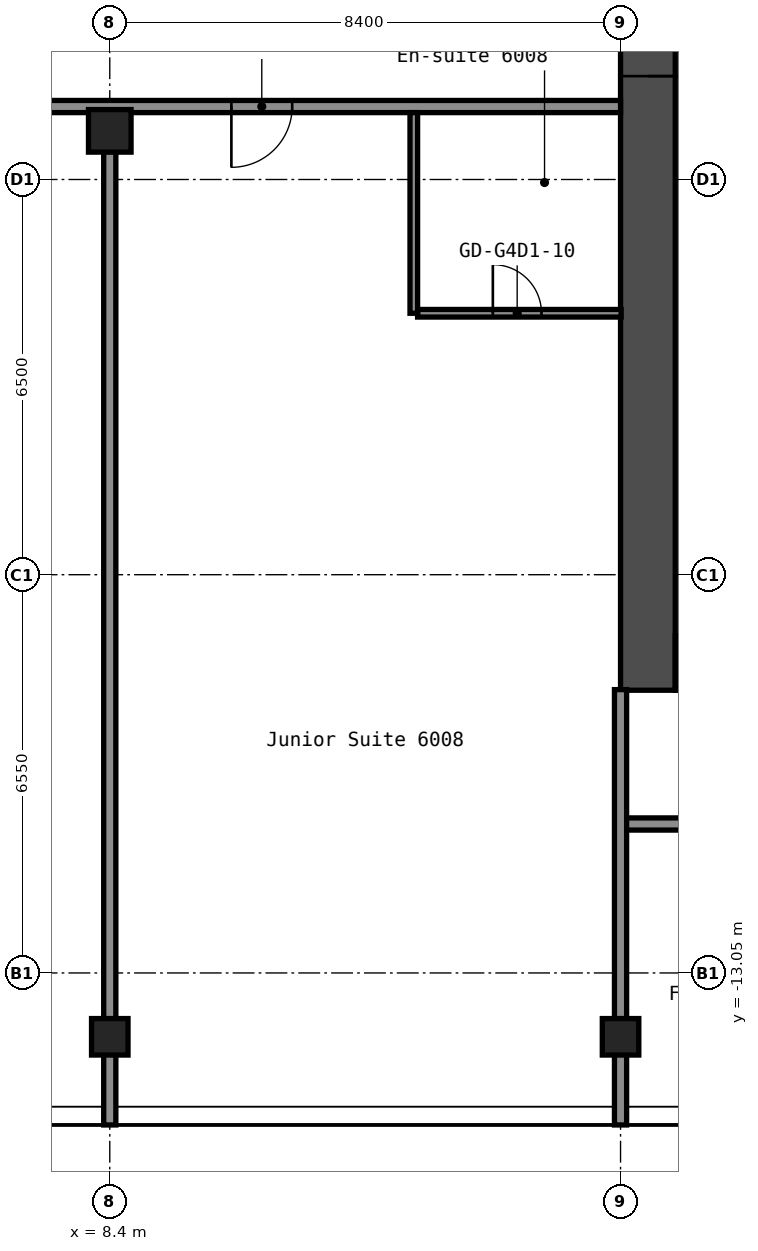
"""IFC4 building model, lengths in metres.
Left out: names, types, materials, properties, quantities, classifications, styles, units other than length and angle.
Written with IfcOpenShell. Run it as: python <this file> out.ifc"""

import sys

from ifc_helpers import new_model, si_unit, direction, frame, frame_2d, origin, origin_2d, place, context, subcontext, project, spatial, rectangle, hollow_rectangle, extrude, element, fill, save


model = new_model("IFC4")
c1 = context("Model", 3, precision=1e-05, world=origin(), true_north=direction((0.0, 1.0)))
c2 = subcontext(c1, "Body", "Model", "MODEL_VIEW")
j1 = project(units=[si_unit("LENGTHUNIT", "METRE"), si_unit("PLANEANGLEUNIT", "RADIAN")], contexts=[c1])
p1 = place(None, origin())
s1 = spatial("IfcSite", under=j1, at=p1, CompositionType="ELEMENT")
p2 = place(p1, origin())
s2 = spatial("IfcBuilding", under=s1, at=p2, CompositionType="ELEMENT")
p3 = place(p2, frame((0.0, 0.0, 212.2)))
s3 = spatial("IfcBuildingStorey", under=s2, at=p3, CompositionType="ELEMENT", Elevation=212.2)
p4 = place(p3, frame((8.4, -14.1, 0.0), z_axis=(0.0, 0.0, 1.0), x_axis=(1.0, 0.0, 0.0)))
e1 = element("IfcColumn", 1, at=p4, inside=s3, PredefinedType="COLUMN", context=c2, shape_type="SweptSolid", body=[
    extrude(hollow_rectangle(XDim=0.6, YDim=0.6, WallThickness=0.025, InnerFilletRadius=0.038, OuterFilletRadius=0.062, at=origin_2d()), origin(), (0.0, 0.0, 1.0), 2.75),
])
p5 = place(p3, frame((8.4, 0.8, 0.0), z_axis=(0.0, 0.0, 1.0), x_axis=(1.0, 0.0, 0.0)))
e2 = element("IfcColumn", 2, at=p5, inside=s3, PredefinedType="COLUMN", context=c2, shape_type="SweptSolid", body=[
    extrude(hollow_rectangle(XDim=0.7, YDim=0.7, WallThickness=0.028, at=origin_2d()), origin(), (0.0, 0.0, 1.0), 2.75),
])
p6 = place(p3, frame((16.8, -14.1, 0.0), z_axis=(0.0, 0.0, 1.0), x_axis=(1.0, 0.0, 0.0)))
e3 = element("IfcColumn", 3, at=p6, inside=s3, PredefinedType="COLUMN", context=c2, shape_type="SweptSolid", body=[
    extrude(hollow_rectangle(XDim=0.6, YDim=0.6, WallThickness=0.025, InnerFilletRadius=0.038, OuterFilletRadius=0.062, at=origin_2d()), origin(), (0.0, 0.0, 1.0), 2.75),
])
p7 = place(p3, frame((17.25, -8.4, 0.0), z_axis=(0.0, 0.0, 1.0), x_axis=(0.0, 1.0, 0.0)))
e4 = element("IfcWall", 4, at=p7, inside=s3, PredefinedType="SHEAR", context=c2, shape_type="SweptSolid", body=[
    extrude(rectangle(XDim=16.8, YDim=0.9, at=frame_2d((8.4, 0.0))), origin(), (0.0, 0.0, 1.0), 2.75),
])
p8 = place(p7, frame((10.1, 0.0, 0.0)))
e5 = element("IfcOpeningElement", 5, at=p8, cuts=e4, PredefinedType="OPENING", context=c2, shape_type="SweptSolid", body=[
    extrude(rectangle(XDim=1.6, YDim=2.1, at=frame_2d((0.8, 1.05))), frame((0.0, 0.46, 0.0), z_axis=(0.0, -1.0, 0.0), x_axis=(1.0, 0.0, 0.0)), (0.0, 0.0, 1.0), 0.92),
])
p9 = place(p3, frame((17.7, -7.95, 0.0), z_axis=(0.0, 0.0, 1.0), x_axis=(1.0, 0.0, 0.0)))
e6 = element("IfcWall", 6, at=p9, inside=s3, PredefinedType="SHEAR", context=c2, shape_type="SweptSolid", body=[
    extrude(rectangle(XDim=15.0, YDim=0.9, at=frame_2d((7.5, 0.0))), origin(), (0.0, 0.0, 1.0), 2.75),
])
p10 = place(p9, frame((2.55, 0.0, 0.0)))
e7 = element("IfcOpeningElement", 7, at=p10, cuts=e6, PredefinedType="OPENING", context=c2, shape_type="SweptSolid", body=[
    extrude(rectangle(XDim=1.0, YDim=2.1, at=frame_2d((0.5, 1.05))), frame((0.0, 0.46, 0.0), z_axis=(0.0, -1.0, 0.0), x_axis=(1.0, 0.0, 0.0)), (0.0, 0.0, 1.0), 0.92),
])
p11 = place(p3, frame((16.8, -10.6, 0.0), z_axis=(0.0, 0.0, 1.0), x_axis=(1.0, 0.0, 0.0)))
e8 = element("IfcWall", 8, at=p11, inside=s3, PredefinedType="PARTITIONING", context=c2, shape_type="SweptSolid", body=[
    extrude(rectangle(XDim=21.3, YDim=0.2, at=frame_2d((10.65, 0.0))), origin(), (0.0, 0.0, 1.0), 2.75),
])
p12 = place(p11, frame((2.155, 0.0, 0.0)))
e9 = element("IfcOpeningElement", 9, at=p12, cuts=e8, PredefinedType="OPENING", context=c2, shape_type="SweptSolid", body=[
    extrude(rectangle(XDim=0.9, YDim=2.1, at=frame_2d((0.45, 1.05))), frame((0.0, 0.11, 0.0), z_axis=(0.0, -1.0, 0.0), x_axis=(1.0, 0.0, 0.0)), (0.0, 0.0, 1.0), 0.22),
])
p13 = place(p11, frame((6.355, 0.0, 0.0)))
e10 = element("IfcOpeningElement", 10, at=p13, cuts=e8, PredefinedType="OPENING", context=c2, shape_type="SweptSolid", body=[
    extrude(rectangle(XDim=0.9, YDim=2.1, at=frame_2d((0.45, 1.05))), frame((0.0, 0.11, 0.0), z_axis=(0.0, -1.0, 0.0), x_axis=(1.0, 0.0, 0.0)), (0.0, 0.0, 1.0), 0.22),
])
p14 = place(p11, frame((10.385, 0.0, 0.0)))
e11 = element("IfcOpeningElement", 11, at=p14, cuts=e8, PredefinedType="OPENING", context=c2, shape_type="SweptSolid", body=[
    extrude(rectangle(XDim=0.9, YDim=2.1, at=frame_2d((0.45, 1.05))), frame((0.0, 0.11, 0.0), z_axis=(0.0, -1.0, 0.0), x_axis=(1.0, 0.0, 0.0)), (0.0, 0.0, 1.0), 0.22),
])
p15 = place(p11, frame((14.585, 0.0, 0.0)))
e12 = element("IfcOpeningElement", 12, at=p15, cuts=e8, PredefinedType="OPENING", context=c2, shape_type="SweptSolid", body=[
    extrude(rectangle(XDim=0.9, YDim=2.1, at=frame_2d((0.45, 1.05))), frame((0.0, 0.11, 0.0), z_axis=(0.0, -1.0, 0.0), x_axis=(1.0, 0.0, 0.0)), (0.0, 0.0, 1.0), 0.22),
])
p16 = place(p11, frame((18.45, 0.0, 0.0)))
e13 = element("IfcOpeningElement", 13, at=p16, cuts=e8, PredefinedType="OPENING", context=c2, shape_type="SweptSolid", body=[
    extrude(rectangle(XDim=0.9, YDim=2.1, at=frame_2d((0.45, 1.05))), frame((0.0, 0.11, 0.0), z_axis=(0.0, -1.0, 0.0), x_axis=(1.0, 0.0, 0.0)), (0.0, 0.0, 1.0), 0.22),
])
p17 = place(p3, frame((13.462, -2.2, 0.0), z_axis=(0.0, 0.0, 1.0), x_axis=(1.0, 0.0, 0.0)))
e14 = element("IfcWall", 14, at=p17, inside=s3, PredefinedType="PARTITIONING", context=c2, shape_type="SweptSolid", body=[
    extrude(rectangle(XDim=3.348, YDim=0.125, at=frame_2d((1.674, 0.0))), origin(), (0.0, 0.0, 1.0), 2.75),
])
p18 = place(p17, frame((1.238, 0.0, 0.0)))
e15 = element("IfcOpeningElement", 15, at=p18, cuts=e14, PredefinedType="OPENING", context=c2, shape_type="SweptSolid", body=[
    extrude(rectangle(XDim=0.8, YDim=2.1, at=frame_2d((0.4, 1.05))), frame((0.0, 0.073, 0.0), z_axis=(0.0, -1.0, 0.0), x_axis=(1.0, 0.0, 0.0)), (0.0, 0.0, 1.0), 0.145),
])
p19 = place(p3, frame((-16.8, 1.2, 0.0), z_axis=(0.0, 0.0, 1.0), x_axis=(1.0, 0.0, 0.0)))
e16 = element("IfcWall", 16, at=p19, inside=s3, PredefinedType="PARTITIONING", context=c2, shape_type="SweptSolid", body=[
    extrude(rectangle(XDim=33.6, YDim=0.2, at=frame_2d((16.8, 0.0))), origin(), (0.0, 0.0, 1.0), 2.75),
])
p20 = place(p19, frame((2.85, 0.0, 0.0)))
e17 = element("IfcOpeningElement", 17, at=p20, cuts=e16, PredefinedType="OPENING", context=c2, shape_type="SweptSolid", body=[
    extrude(rectangle(XDim=1.0, YDim=2.1, at=frame_2d((0.5, 1.05))), frame((0.0, 0.11, 0.0), z_axis=(0.0, -1.0, 0.0), x_axis=(1.0, 0.0, 0.0)), (0.0, 0.0, 1.0), 0.22),
])
p21 = place(p19, frame((4.55, 0.0, 0.0)))
e18 = element("IfcOpeningElement", 18, at=p21, cuts=e16, PredefinedType="OPENING", context=c2, shape_type="SweptSolid", body=[
    extrude(rectangle(XDim=1.0, YDim=2.1, at=frame_2d((0.5, 1.05))), frame((0.0, 0.11, 0.0), z_axis=(0.0, -1.0, 0.0), x_axis=(1.0, 0.0, 0.0)), (0.0, 0.0, 1.0), 0.22),
])
p22 = place(p19, frame((12.1, 0.0, 0.0)))
e19 = element("IfcOpeningElement", 19, at=p22, cuts=e16, PredefinedType="OPENING", context=c2, shape_type="SweptSolid", body=[
    extrude(rectangle(XDim=1.0, YDim=2.1, at=frame_2d((0.5, 1.05))), frame((0.0, 0.11, 0.0), z_axis=(0.0, -1.0, 0.0), x_axis=(1.0, 0.0, 0.0)), (0.0, 0.0, 1.0), 0.22),
])
p23 = place(p19, frame((22.3, 0.0, 0.0)))
e20 = element("IfcOpeningElement", 20, at=p23, cuts=e16, PredefinedType="OPENING", context=c2, shape_type="SweptSolid", body=[
    extrude(rectangle(XDim=1.0, YDim=2.1, at=frame_2d((0.5, 1.05))), frame((0.0, 0.11, 0.0), z_axis=(0.0, -1.0, 0.0), x_axis=(1.0, 0.0, 0.0)), (0.0, 0.0, 1.0), 0.22),
])
p24 = place(p19, frame((27.2, 0.0, 0.0)))
e21 = element("IfcOpeningElement", 21, at=p24, cuts=e16, PredefinedType="OPENING", context=c2, shape_type="SweptSolid", body=[
    extrude(rectangle(XDim=1.0, YDim=2.1, at=frame_2d((0.5, 1.05))), frame((0.0, 0.11, 0.0), z_axis=(0.0, -1.0, 0.0), x_axis=(1.0, 0.0, 0.0)), (0.0, 0.0, 1.0), 0.22),
])
p25 = place(p3, frame((8.4, -15.55, 0.0), z_axis=(0.0, 0.0, 1.0), x_axis=(0.0, 1.0, 0.0)))
e22 = element("IfcWall", 22, at=p25, inside=s3, PredefinedType="PARTITIONING", context=c2, shape_type="SweptSolid", body=[
    extrude(rectangle(XDim=16.01, YDim=0.2, at=frame_2d((8.005, 0.0))), origin(), (0.0, 0.0, 1.0), 2.75),
])
p26 = place(p3, frame((13.4, -2.2, 0.0), z_axis=(0.0, 0.0, 1.0), x_axis=(0.0, 1.0, 0.0)))
e23 = element("IfcWall", 23, at=p26, inside=s3, PredefinedType="PARTITIONING", context=c2, shape_type="SweptSolid", body=[
    extrude(rectangle(XDim=3.3, YDim=0.125, at=frame_2d((1.65, 0.0))), origin(), (0.0, 0.0, 1.0), 2.75),
])
p27 = place(p3, frame((16.8, -15.55, 0.0), z_axis=(0.0, 0.0, 1.0), x_axis=(0.0, 1.0, 0.0)))
e24 = element("IfcWall", 24, at=p27, inside=s3, PredefinedType="PARTITIONING", context=c2, shape_type="SweptSolid", body=[
    extrude(rectangle(XDim=7.16, YDim=0.2, at=frame_2d((3.58, 0.0))), origin(), (0.0, 0.0, 1.0), 2.75),
])
p28 = place(p8, origin())
e25 = element("IfcDoor", 25, at=p28, inside=s3, OperationType="DOUBLE_DOOR_SINGLE_SWING", PredefinedType="DOOR", context=c2, shape_type="SweptSolid", body=[
    extrude(rectangle(XDim=1.6, YDim=2.1, at=frame_2d((0.8, 1.05))), frame((0.0, 0.025, 0.0), z_axis=(0.0, -1.0, 0.0), x_axis=(1.0, 0.0, 0.0)), (0.0, 0.0, 1.0), 0.05),
])
fill(e5, e25)
p29 = place(p18, origin())
e26 = element("IfcDoor", 26, at=p29, inside=s3, OperationType="SINGLE_SWING_RIGHT", PredefinedType="DOOR", context=c2, shape_type="SweptSolid", body=[
    extrude(rectangle(XDim=0.8, YDim=2.1, at=frame_2d((0.4, 1.05))), frame((0.0, 0.025, 0.0), z_axis=(0.0, -1.0, 0.0), x_axis=(1.0, 0.0, 0.0)), (0.0, 0.0, 1.0), 0.05),
])
fill(e15, e26)
p30 = place(p24, origin())
e27 = element("IfcDoor", 27, at=p30, inside=s3, OperationType="SINGLE_SWING_LEFT", PredefinedType="DOOR", context=c2, shape_type="SweptSolid", body=[
    extrude(rectangle(XDim=1.0, YDim=2.1, at=frame_2d((0.5, 1.05))), frame((0.0, 0.025, 0.0), z_axis=(0.0, -1.0, 0.0), x_axis=(1.0, 0.0, 0.0)), (0.0, 0.0, 1.0), 0.05),
])
fill(e21, e27)
save(model, sys.argv[1])
